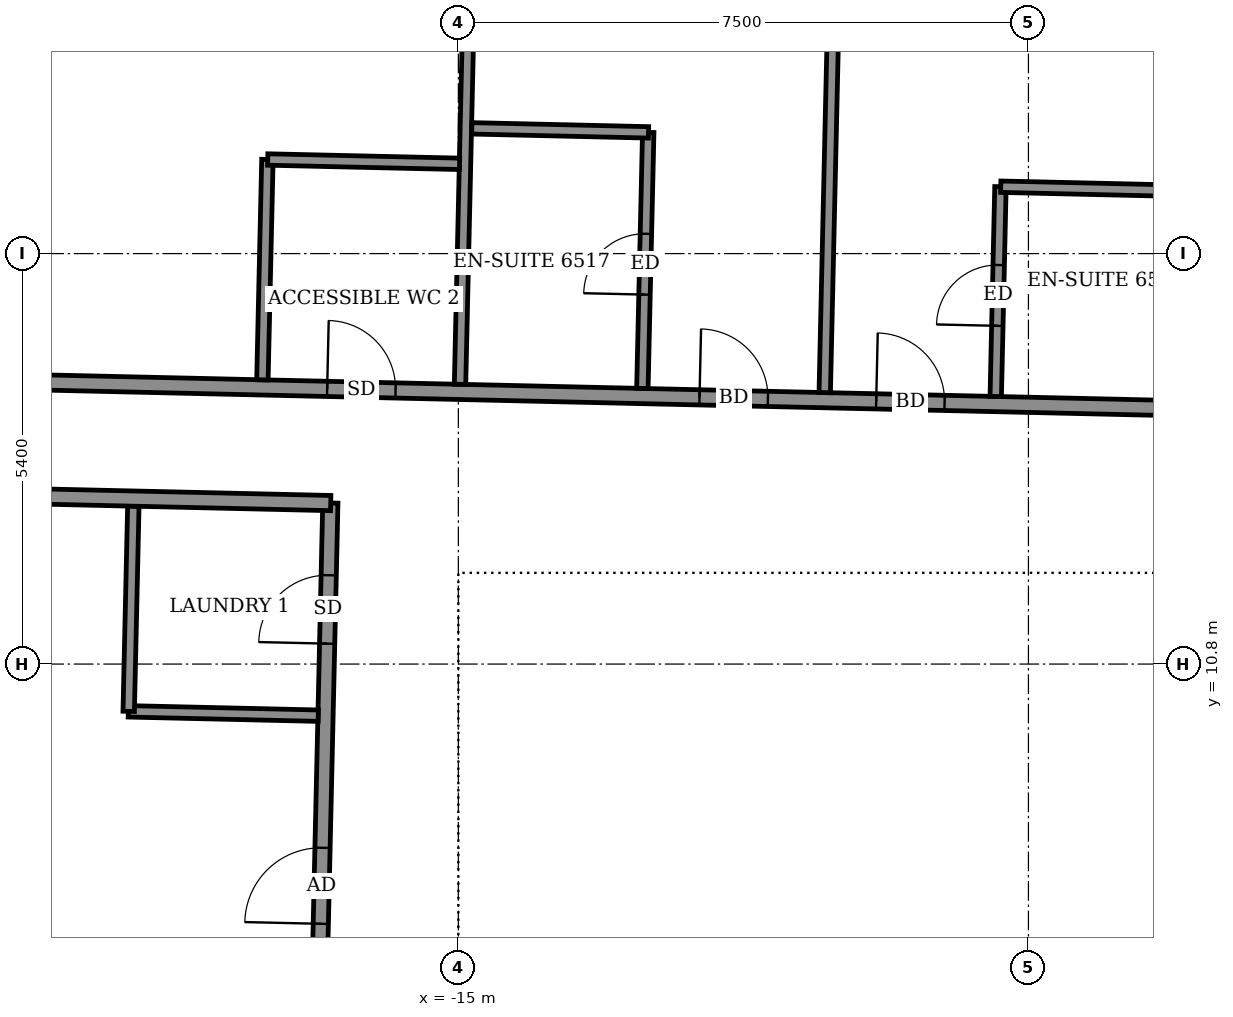
"""IFC4 building model, lengths in metres.
Left out: names, types, materials, properties, quantities, classifications, styles, units other than length and angle.
Written with IfcOpenShell. Run it as: python <this file> out.ifc"""

import sys

from ifc_helpers import new_model, si_unit, direction, frame, frame_2d, origin, place, context, subcontext, project, spatial, rectangle, extrude, element, fill, save


model = new_model("IFC4")
c1 = context("Model", 3, precision=1e-05, world=origin(), true_north=direction((0.0, 1.0)))
c2 = subcontext(c1, "Body", "Model", "MODEL_VIEW")
j1 = project(units=[si_unit("LENGTHUNIT", "METRE"), si_unit("PLANEANGLEUNIT", "RADIAN")], contexts=[c1])
p1 = place(None, origin())
s1 = spatial("IfcSite", under=j1, at=p1, CompositionType="ELEMENT")
p2 = place(p1, origin())
s2 = spatial("IfcBuilding", under=s1, at=p2, CompositionType="ELEMENT")
p3 = place(p2, frame((0.0, 0.0, 257.3)))
s3 = spatial("IfcBuildingStorey", under=s2, at=p3, CompositionType="ELEMENT", Elevation=257.3)
p4 = place(p3, frame((-17.262, -12.525, 0.0), z_axis=(0.0, 0.0, 1.0), x_axis=(0.022706151961, 0.999742182097, 0.0)))
e1 = element("IfcWall", 1, at=p4, inside=s3, PredefinedType="PARTITIONING", context=c2, shape_type="SweptSolid", body=[
    extrude(rectangle(XDim=25.45, YDim=0.2, at=frame_2d((12.725, 0.0))), origin(), (0.0, 0.0, 1.0), 3.05),
])
p5 = place(p4, frame((19.913, 0.0, 0.0)))
e2 = element("IfcOpeningElement", 2, at=p5, cuts=e1, PredefinedType="OPENING", context=c2, shape_type="SweptSolid", body=[
    extrude(rectangle(XDim=1.0, YDim=2.1, at=frame_2d((0.5, 1.05))), frame((0.0, 0.11, 0.0), z_axis=(0.0, -1.0, 0.0), x_axis=(1.0, 0.0, 0.0)), (0.0, 0.0, 1.0), 0.22),
])
p6 = place(p4, frame((23.6, 0.0, 0.0)))
e3 = element("IfcOpeningElement", 3, at=p6, cuts=e1, PredefinedType="OPENING", context=c2, shape_type="SweptSolid", body=[
    extrude(rectangle(XDim=0.9, YDim=2.1, at=frame_2d((0.45, 1.05))), frame((0.0, 0.11, 0.0), z_axis=(0.0, -1.0, 0.0), x_axis=(1.0, 0.0, 0.0)), (0.0, 0.0, 1.0), 0.22),
])
p7 = place(p4, frame((14.05, 0.0, 0.0)))
e4 = element("IfcOpeningElement", 4, at=p7, cuts=e1, PredefinedType="OPENING", context=c2, shape_type="SweptSolid", body=[
    extrude(rectangle(XDim=1.0, YDim=2.1, at=frame_2d((0.5, 1.05))), frame((0.0, 0.11, 0.0), z_axis=(0.0, -1.0, 0.0), x_axis=(1.0, 0.0, 0.0)), (0.0, 0.0, 1.0), 0.22),
])
p8 = place(p4, frame((16.525, 0.0, 0.0)))
e5 = element("IfcOpeningElement", 5, at=p8, cuts=e1, PredefinedType="OPENING", context=c2, shape_type="SweptSolid", body=[
    extrude(rectangle(XDim=0.9, YDim=2.1, at=frame_2d((0.45, 1.05))), frame((0.0, 0.11, 0.0), z_axis=(0.0, -1.0, 0.0), x_axis=(1.0, 0.0, 0.0)), (0.0, 0.0, 1.0), 0.22),
])
p9 = place(p4, frame((11.825, 0.0, 0.0)))
e6 = element("IfcOpeningElement", 6, at=p9, cuts=e1, PredefinedType="OPENING", context=c2, shape_type="SweptSolid", body=[
    extrude(rectangle(XDim=1.0, YDim=2.1, at=frame_2d((0.5, 1.05))), frame((0.0, 0.11, 0.0), z_axis=(0.0, -1.0, 0.0), x_axis=(1.0, 0.0, 0.0)), (0.0, 0.0, 1.0), 0.22),
])
p10 = place(p4, frame((9.575, 0.0, 0.0)))
e7 = element("IfcOpeningElement", 7, at=p10, cuts=e1, PredefinedType="OPENING", context=c2, shape_type="SweptSolid", body=[
    extrude(rectangle(XDim=0.9, YDim=2.1, at=frame_2d((0.45, 1.05))), frame((0.0, 0.11, 0.0), z_axis=(0.0, -1.0, 0.0), x_axis=(1.0, 0.0, 0.0)), (0.0, 0.0, 1.0), 0.22),
])
p11 = place(p4, frame((6.155, 0.0, 0.0)))
e8 = element("IfcOpeningElement", 8, at=p11, cuts=e1, PredefinedType="OPENING", context=c2, shape_type="SweptSolid", body=[
    extrude(rectangle(XDim=1.0, YDim=2.1, at=frame_2d((0.5, 1.05))), frame((0.0, 0.11, 0.0), z_axis=(0.0, -1.0, 0.0), x_axis=(1.0, 0.0, 0.0)), (0.0, 0.0, 1.0), 0.22),
])
p12 = place(p4, frame((0.512, 0.0, 0.0)))
e9 = element("IfcOpeningElement", 9, at=p12, cuts=e1, PredefinedType="OPENING", context=c2, shape_type="SweptSolid", body=[
    extrude(rectangle(XDim=1.0, YDim=2.1, at=frame_2d((0.5, 1.05))), frame((0.0, 0.11, 0.0), z_axis=(0.0, -1.0, 0.0), x_axis=(1.0, 0.0, 0.0)), (0.0, 0.0, 1.0), 0.22),
])
p13 = place(p4, frame((2.775, 0.0, 0.0)))
e10 = element("IfcOpeningElement", 10, at=p13, cuts=e1, PredefinedType="OPENING", context=c2, shape_type="SweptSolid", body=[
    extrude(rectangle(XDim=0.9, YDim=2.1, at=frame_2d((0.45, 1.05))), frame((0.0, 0.11, 0.0), z_axis=(0.0, -1.0, 0.0), x_axis=(1.0, 0.0, 0.0)), (0.0, 0.0, 1.0), 0.22),
])
p14 = place(p3, frame((-19.342, 10.178, 0.0), z_axis=(0.0, 0.0, 1.0), x_axis=(0.999741028149, -0.022756903044, 0.0)))
e11 = element("IfcWall", 11, at=p14, inside=s3, PredefinedType="PARTITIONING", context=c2, shape_type="SweptSolid", body=[
    extrude(rectangle(XDim=2.5, YDim=0.15, at=frame_2d((1.25, 0.0))), origin(), (0.0, 0.0, 1.0), 3.05),
])
p15 = place(p3, frame((-19.337, 10.178, 0.0), z_axis=(0.0, 0.0, 1.0), x_axis=(0.02260842146, 0.999744396973, 0.0)))
e12 = element("IfcWall", 12, at=p15, inside=s3, PredefinedType="PARTITIONING", context=c2, shape_type="SweptSolid", body=[
    extrude(rectangle(XDim=2.7, YDim=0.15, at=frame_2d((1.35, 0.0))), origin(), (0.0, 0.0, 1.0), 3.05),
])
p16 = place(p3, frame((-24.508, 13.096, 0.0), z_axis=(0.0, 0.0, 1.0), x_axis=(0.99974170677, -0.022727070732, 0.0)))
e13 = element("IfcWall", 13, at=p16, inside=s3, PredefinedType="PARTITIONING", context=c2, shape_type="SweptSolid", body=[
    extrude(rectangle(XDim=7.831, YDim=0.2, at=frame_2d((3.916, 0.0))), origin(), (0.0, 0.0, 1.0), 3.05),
])
p17 = place(p3, frame((-24.474, 14.596, 0.0), z_axis=(0.0, 0.0, 1.0), x_axis=(0.999742424031, -0.022695497208, 0.0)))
e14 = element("IfcWall", 14, at=p17, inside=s3, PredefinedType="PARTITIONING", context=c2, shape_type="SweptSolid", body=[
    extrude(rectangle(XDim=52.872, YDim=0.2, at=frame_2d((26.436, 0.0))), origin(), (0.0, 0.0, 1.0), 3.05),
])
p18 = place(p17, frame((51.336, 0.0, 0.0)))
e15 = element("IfcOpeningElement", 15, at=p18, cuts=e14, PredefinedType="OPENING", context=c2, shape_type="SweptSolid", body=[
    extrude(rectangle(XDim=1.0, YDim=2.1, at=frame_2d((0.5, 1.05))), frame((0.0, 0.11, 0.0), z_axis=(0.0, -1.0, 0.0), x_axis=(1.0, 0.0, 0.0)), (0.0, 0.0, 1.0), 0.22),
])
p19 = place(p17, frame((47.25, 0.0, 0.0)))
e16 = element("IfcOpeningElement", 16, at=p19, cuts=e14, PredefinedType="OPENING", context=c2, shape_type="SweptSolid", body=[
    extrude(rectangle(XDim=0.9, YDim=2.1, at=frame_2d((0.45, 1.05))), frame((0.0, 0.11, 0.0), z_axis=(0.0, -1.0, 0.0), x_axis=(1.0, 0.0, 0.0)), (0.0, 0.0, 1.0), 0.22),
])
p20 = place(p17, frame((42.475, 0.0, 0.0)))
e17 = element("IfcOpeningElement", 17, at=p20, cuts=e14, PredefinedType="OPENING", context=c2, shape_type="SweptSolid", body=[
    extrude(rectangle(XDim=0.9, YDim=2.1, at=frame_2d((0.45, 1.05))), frame((0.0, 0.11, 0.0), z_axis=(0.0, -1.0, 0.0), x_axis=(1.0, 0.0, 0.0)), (0.0, 0.0, 1.0), 0.22),
])
p21 = place(p17, frame((40.15, 0.0, 0.0)))
e18 = element("IfcOpeningElement", 18, at=p21, cuts=e14, PredefinedType="OPENING", context=c2, shape_type="SweptSolid", body=[
    extrude(rectangle(XDim=0.9, YDim=2.1, at=frame_2d((0.45, 1.05))), frame((0.0, 0.11, 0.0), z_axis=(0.0, -1.0, 0.0), x_axis=(1.0, 0.0, 0.0)), (0.0, 0.0, 1.0), 0.22),
])
p22 = place(p17, frame((33.15, 0.0, 0.0)))
e19 = element("IfcOpeningElement", 19, at=p22, cuts=e14, PredefinedType="OPENING", context=c2, shape_type="SweptSolid", body=[
    extrude(rectangle(XDim=0.9, YDim=2.1, at=frame_2d((0.45, 1.05))), frame((0.0, 0.11, 0.0), z_axis=(0.0, -1.0, 0.0), x_axis=(1.0, 0.0, 0.0)), (0.0, 0.0, 1.0), 0.22),
])
p23 = place(p17, frame((30.95, 0.0, 0.0)))
e20 = element("IfcOpeningElement", 20, at=p23, cuts=e14, PredefinedType="OPENING", context=c2, shape_type="SweptSolid", body=[
    extrude(rectangle(XDim=0.9, YDim=2.1, at=frame_2d((0.45, 1.05))), frame((0.0, 0.11, 0.0), z_axis=(0.0, -1.0, 0.0), x_axis=(1.0, 0.0, 0.0)), (0.0, 0.0, 1.0), 0.22),
])
p24 = place(p17, frame((23.975, 0.0, 0.0)))
e21 = element("IfcOpeningElement", 21, at=p24, cuts=e14, PredefinedType="OPENING", context=c2, shape_type="SweptSolid", body=[
    extrude(rectangle(XDim=0.9, YDim=2.1, at=frame_2d((0.45, 1.05))), frame((0.0, 0.11, 0.0), z_axis=(0.0, -1.0, 0.0), x_axis=(1.0, 0.0, 0.0)), (0.0, 0.0, 1.0), 0.22),
])
p25 = place(p17, frame((21.925, 0.0, 0.0)))
e22 = element("IfcOpeningElement", 22, at=p25, cuts=e14, PredefinedType="OPENING", context=c2, shape_type="SweptSolid", body=[
    extrude(rectangle(XDim=0.9, YDim=2.1, at=frame_2d((0.45, 1.05))), frame((0.0, 0.11, 0.0), z_axis=(0.0, -1.0, 0.0), x_axis=(1.0, 0.0, 0.0)), (0.0, 0.0, 1.0), 0.22),
])
p26 = place(p17, frame((14.975, 0.0, 0.0)))
e23 = element("IfcOpeningElement", 23, at=p26, cuts=e14, PredefinedType="OPENING", context=c2, shape_type="SweptSolid", body=[
    extrude(rectangle(XDim=0.9, YDim=2.1, at=frame_2d((0.45, 1.05))), frame((0.0, 0.11, 0.0), z_axis=(0.0, -1.0, 0.0), x_axis=(1.0, 0.0, 0.0)), (0.0, 0.0, 1.0), 0.22),
])
p27 = place(p17, frame((12.65, 0.0, 0.0)))
e24 = element("IfcOpeningElement", 24, at=p27, cuts=e14, PredefinedType="OPENING", context=c2, shape_type="SweptSolid", body=[
    extrude(rectangle(XDim=0.9, YDim=2.1, at=frame_2d((0.45, 1.05))), frame((0.0, 0.11, 0.0), z_axis=(0.0, -1.0, 0.0), x_axis=(1.0, 0.0, 0.0)), (0.0, 0.0, 1.0), 0.22),
])
p28 = place(p17, frame((2.0, 0.0, 0.0)))
e25 = element("IfcOpeningElement", 25, at=p28, cuts=e14, PredefinedType="OPENING", context=c2, shape_type="SweptSolid", body=[
    extrude(rectangle(XDim=1.0, YDim=2.1, at=frame_2d((0.5, 1.05))), frame((0.0, 0.11, 0.0), z_axis=(0.0, -1.0, 0.0), x_axis=(1.0, 0.0, 0.0)), (0.0, 0.0, 1.0), 0.22),
])
p29 = place(p17, frame((7.75, 0.0, 0.0)))
e26 = element("IfcOpeningElement", 26, at=p29, cuts=e14, PredefinedType="OPENING", context=c2, shape_type="SweptSolid", body=[
    extrude(rectangle(XDim=0.9, YDim=2.1, at=frame_2d((0.45, 1.05))), frame((0.0, 0.11, 0.0), z_axis=(0.0, -1.0, 0.0), x_axis=(1.0, 0.0, 0.0)), (0.0, 0.0, 1.0), 0.22),
])
p30 = place(p3, frame((-17.578, 14.539, 0.0), z_axis=(0.0, 0.0, 1.0), x_axis=(0.022725229174, 0.999741748633, 0.0)))
e27 = element("IfcWall", 27, at=p30, inside=s3, PredefinedType="PARTITIONING", context=c2, shape_type="SweptSolid", body=[
    extrude(rectangle(XDim=2.901, YDim=0.15, at=frame_2d((1.45, 0.0))), origin(), (0.0, 0.0, 1.0), 3.05),
])
p31 = place(p3, frame((-14.978, 14.48, 0.0), z_axis=(0.0, 0.0, 1.0), x_axis=(0.022697424684, 0.999742380272, 0.0)))
e28 = element("IfcWall", 28, at=p31, inside=s3, PredefinedType="PARTITIONING", context=c2, shape_type="SweptSolid", body=[
    extrude(rectangle(XDim=9.25, YDim=0.15, at=frame_2d((4.625, 0.0))), origin(), (0.0, 0.0, 1.0), 3.05),
])
p32 = place(p3, frame((-12.579, 14.426, 0.0), z_axis=(0.0, 0.0, 1.0), x_axis=(0.022894207861, 0.999737893273, 0.0)))
e29 = element("IfcWall", 29, at=p32, inside=s3, PredefinedType="PARTITIONING", context=c2, shape_type="SweptSolid", body=[
    extrude(rectangle(XDim=3.37, YDim=0.15, at=frame_2d((1.685, 0.0))), origin(), (0.0, 0.0, 1.0), 3.05),
])
p33 = place(p32, frame((1.235, 0.0, 0.0)))
e30 = element("IfcOpeningElement", 30, at=p33, cuts=e29, PredefinedType="OPENING", context=c2, shape_type="SweptSolid", body=[
    extrude(rectangle(XDim=0.8, YDim=2.1, at=frame_2d((0.4, 1.05))), frame((0.0, 0.085, 0.0), z_axis=(0.0, -1.0, 0.0), x_axis=(1.0, 0.0, 0.0)), (0.0, 0.0, 1.0), 0.17),
])
p34 = place(p3, frame((-10.18, 14.371, 0.0), z_axis=(0.0, 0.0, 1.0), x_axis=(0.022698023584, 0.999742366675, 0.0)))
e31 = element("IfcWall", 31, at=p34, inside=s3, PredefinedType="PARTITIONING", context=c2, shape_type="SweptSolid", body=[
    extrude(rectangle(XDim=9.25, YDim=0.15, at=frame_2d((4.625, 0.0))), origin(), (0.0, 0.0, 1.0), 2.55),
])
p35 = place(p3, frame((-7.93, 14.32, 0.0), z_axis=(0.0, 0.0, 1.0), x_axis=(0.022462265691, 0.99974769148, 0.0)))
e32 = element("IfcWall", 32, at=p35, inside=s3, PredefinedType="PARTITIONING", context=c2, shape_type="SweptSolid", body=[
    extrude(rectangle(XDim=2.761, YDim=0.15, at=frame_2d((1.38, 0.0))), origin(), (0.0, 0.0, 1.0), 3.05),
])
p36 = place(p35, frame((0.93, 0.0, 0.0)))
e33 = element("IfcOpeningElement", 33, at=p36, cuts=e32, PredefinedType="OPENING", context=c2, shape_type="SweptSolid", body=[
    extrude(rectangle(XDim=0.8, YDim=2.1, at=frame_2d((0.4, 1.05))), frame((0.0, 0.085, 0.0), z_axis=(0.0, -1.0, 0.0), x_axis=(1.0, 0.0, 0.0)), (0.0, 0.0, 1.0), 0.17),
])
p37 = place(p3, frame((-7.864, 17.08, 0.0), z_axis=(0.0, 0.0, 1.0), x_axis=(0.999740478815, -0.022781023197, 0.0)))
e34 = element("IfcWall", 34, at=p37, inside=s3, PredefinedType="PARTITIONING", context=c2, shape_type="SweptSolid", body=[
    extrude(rectangle(XDim=2.325, YDim=0.15, at=frame_2d((1.163, 0.0))), origin(), (0.0, 0.0, 1.0), 3.05),
])
p38 = place(p3, frame((-17.508, 17.438, 0.0), z_axis=(0.0, 0.0, 1.0), x_axis=(0.999746160391, -0.022530308093, 0.0)))
e35 = element("IfcWall", 35, at=p38, inside=s3, PredefinedType="PARTITIONING", context=c2, shape_type="SweptSolid", body=[
    extrude(rectangle(XDim=2.525, YDim=0.15, at=frame_2d((1.262, 0.0))), origin(), (0.0, 0.0, 1.0), 3.05),
])
p39 = place(p3, frame((-14.823, 17.848, 0.0), z_axis=(0.0, 0.0, 1.0), x_axis=(0.999740478815, -0.022781023197, 0.0)))
e36 = element("IfcWall", 36, at=p39, inside=s3, PredefinedType="PARTITIONING", context=c2, shape_type="SweptSolid", body=[
    extrude(rectangle(XDim=2.325, YDim=0.15, at=frame_2d((1.163, 0.0))), origin(), (0.0, 0.0, 1.0), 3.05),
])
p40 = place(p3, frame((-14.5, 11.15, 0.0), z_axis=(0.0, 0.0, 1.0), x_axis=(1.0, 0.0, 0.0)))
e37 = element("IfcWall", 37, at=p40, inside=s3, PredefinedType="SHEAR", context=c2, shape_type="SweptSolid", body=[
    extrude(rectangle(XDim=29.0, YDim=0.7, at=frame_2d((14.5, 0.0))), origin(), (0.0, 0.0, 1.0), 3.6),
])
p41 = place(p3, frame((-14.15, -10.8, 0.0), z_axis=(0.0, 0.0, 1.0), x_axis=(0.0, 1.0, 0.0)))
e38 = element("IfcWall", 38, at=p41, inside=s3, PredefinedType="SHEAR", context=c2, shape_type="SweptSolid", body=[
    extrude(rectangle(XDim=21.6, YDim=0.7, at=frame_2d((10.8, 0.0))), origin(), (0.0, 0.0, 1.0), 3.6),
])
p42 = place(p41, frame((8.25, 0.0, 0.0)))
e39 = element("IfcOpeningElement", 39, at=p42, cuts=e38, PredefinedType="OPENING", context=c2, shape_type="SweptSolid", body=[
    extrude(rectangle(XDim=1.2, YDim=2.1, at=frame_2d((0.6, 1.05))), frame((0.0, 0.36, 0.0), z_axis=(0.0, -1.0, 0.0), x_axis=(1.0, 0.0, 0.0)), (0.0, 0.0, 1.0), 0.72),
])
p43 = place(p41, frame((15.25, 0.0, 0.0)))
e40 = element("IfcOpeningElement", 40, at=p43, cuts=e38, PredefinedType="OPENING", context=c2, shape_type="SweptSolid", body=[
    extrude(rectangle(XDim=1.2, YDim=2.1, at=frame_2d((0.6, 1.05))), frame((0.0, 0.36, 0.0), z_axis=(0.0, -1.0, 0.0), x_axis=(1.0, 0.0, 0.0)), (0.0, 0.0, 1.0), 0.72),
])
p44 = place(p3, frame((-10.9, 8.1, 0.0), z_axis=(0.0, 0.0, 1.0), x_axis=(1.0, 0.0, 0.0)))
e41 = element("IfcWall", 41, at=p44, inside=s3, PredefinedType="SHEAR", context=c2, shape_type="SweptSolid", body=[
    extrude(rectangle(XDim=21.8, YDim=0.2, at=frame_2d((10.9, 0.0))), origin(), (0.0, 0.0, 1.0), 3.05),
])
p45 = place(p44, frame((4.95, 0.0, 0.0)))
e42 = element("IfcOpeningElement", 42, at=p45, cuts=e41, PredefinedType="OPENING", context=c2, shape_type="SweptSolid", body=[
    extrude(rectangle(XDim=1.1, YDim=2.1, at=frame_2d((0.55, 1.05))), frame((0.0, 0.11, 0.0), z_axis=(0.0, -1.0, 0.0), x_axis=(1.0, 0.0, 0.0)), (0.0, 0.0, 1.0), 0.22),
])
p46 = place(p44, frame((7.65, 0.0, 0.0)))
e43 = element("IfcOpeningElement", 43, at=p46, cuts=e41, PredefinedType="OPENING", context=c2, shape_type="SweptSolid", body=[
    extrude(rectangle(XDim=1.1, YDim=2.1, at=frame_2d((0.55, 1.05))), frame((0.0, 0.11, 0.0), z_axis=(0.0, -1.0, 0.0), x_axis=(1.0, 0.0, 0.0)), (0.0, 0.0, 1.0), 0.22),
])
p47 = place(p44, frame((10.35, 0.0, 0.0)))
e44 = element("IfcOpeningElement", 44, at=p47, cuts=e41, PredefinedType="OPENING", context=c2, shape_type="SweptSolid", body=[
    extrude(rectangle(XDim=1.1, YDim=2.1, at=frame_2d((0.55, 1.05))), frame((0.0, 0.11, 0.0), z_axis=(0.0, -1.0, 0.0), x_axis=(1.0, 0.0, 0.0)), (0.0, 0.0, 1.0), 0.22),
])
p48 = place(p44, frame((1.675, 0.0, 0.0)))
e45 = element("IfcOpeningElement", 45, at=p48, cuts=e41, PredefinedType="OPENING", context=c2, shape_type="SweptSolid", body=[
    extrude(rectangle(XDim=0.9, YDim=2.1, at=frame_2d((0.45, 1.05))), frame((0.0, 0.11, 0.0), z_axis=(0.0, -1.0, 0.0), x_axis=(1.0, 0.0, 0.0)), (0.0, 0.0, 1.0), 0.22),
])
p49 = place(p44, frame((13.825, 0.0, 0.0)))
e46 = element("IfcOpeningElement", 46, at=p49, cuts=e41, PredefinedType="OPENING", context=c2, shape_type="SweptSolid", body=[
    extrude(rectangle(XDim=0.9, YDim=2.1, at=frame_2d((0.45, 1.05))), frame((0.0, 0.11, 0.0), z_axis=(0.0, -1.0, 0.0), x_axis=(1.0, 0.0, 0.0)), (0.0, 0.0, 1.0), 0.22),
])
p50 = place(p44, frame((18.55, 0.0, 0.0)))
e47 = element("IfcOpeningElement", 47, at=p50, cuts=e41, PredefinedType="OPENING", context=c2, shape_type="SweptSolid", body=[
    extrude(rectangle(XDim=0.9, YDim=2.1, at=frame_2d((0.45, 1.05))), frame((0.0, 0.11, 0.0), z_axis=(0.0, -1.0, 0.0), x_axis=(1.0, 0.0, 0.0)), (0.0, 0.0, 1.0), 0.22),
])
p51 = place(p3, frame((-10.8, 8.2, 0.0), z_axis=(0.0, 0.0, 1.0), x_axis=(0.0, 1.0, 0.0)))
e48 = element("IfcWall", 48, at=p51, inside=s3, PredefinedType="STANDARD", context=c2, shape_type="SweptSolid", body=[
    extrude(rectangle(XDim=2.6, YDim=0.2, at=frame_2d((1.3, 0.0))), origin(), (0.0, 0.0, 1.0), 3.05),
])
p52 = place(p3, frame((-6.75, 8.2, 0.0), z_axis=(0.0, 0.0, 1.0), x_axis=(0.0, 1.0, 0.0)))
e49 = element("IfcWall", 49, at=p52, inside=s3, PredefinedType="SHEAR", context=c2, shape_type="SweptSolid", body=[
    extrude(rectangle(XDim=2.6, YDim=0.2, at=frame_2d((1.3, 0.0))), origin(), (0.0, 0.0, 1.0), 3.05),
])
p53 = place(p26, origin())
e50 = element("IfcDoor", 50, at=p53, inside=s3, OperationType="SINGLE_SWING_RIGHT", PredefinedType="DOOR", context=c2, shape_type="SweptSolid", body=[
    extrude(rectangle(XDim=0.9, YDim=2.1, at=frame_2d((0.45, 1.05))), frame((0.0, 0.025, 0.0), z_axis=(0.0, -1.0, 0.0), x_axis=(1.0, 0.0, 0.0)), (0.0, 0.0, 1.0), 0.05),
])
fill(e23, e50)
p54 = place(p36, origin())
e51 = element("IfcDoor", 51, at=p54, inside=s3, OperationType="SINGLE_SWING_RIGHT", PredefinedType="DOOR", context=c2, shape_type="SweptSolid", body=[
    extrude(rectangle(XDim=0.8, YDim=2.1, at=frame_2d((0.4, 1.05))), frame((0.0, 0.025, 0.0), z_axis=(0.0, -1.0, 0.0), x_axis=(1.0, 0.0, 0.0)), (0.0, 0.0, 1.0), 0.05),
])
fill(e33, e51)
p55 = place(p27, origin())
e52 = element("IfcDoor", 52, at=p55, inside=s3, OperationType="SINGLE_SWING_LEFT", PredefinedType="DOOR", context=c2, shape_type="SweptSolid", body=[
    extrude(rectangle(XDim=0.9, YDim=2.1, at=frame_2d((0.45, 1.05))), frame((0.0, 0.025, 0.0), z_axis=(0.0, -1.0, 0.0), x_axis=(1.0, 0.0, 0.0)), (0.0, 0.0, 1.0), 0.05),
])
fill(e24, e52)
p56 = place(p33, origin())
e53 = element("IfcDoor", 53, at=p56, inside=s3, OperationType="SINGLE_SWING_LEFT", PredefinedType="DOOR", context=c2, shape_type="SweptSolid", body=[
    extrude(rectangle(XDim=0.8, YDim=2.1, at=frame_2d((0.4, 1.05))), frame((0.0, 0.025, 0.0), z_axis=(0.0, -1.0, 0.0), x_axis=(1.0, 0.0, 0.0)), (0.0, 0.0, 1.0), 0.05),
])
fill(e30, e53)
p57 = place(p29, origin())
e54 = element("IfcDoor", 54, at=p57, inside=s3, OperationType="SINGLE_SWING_RIGHT", PredefinedType="DOOR", context=c2, shape_type="SweptSolid", body=[
    extrude(rectangle(XDim=0.9, YDim=2.1, at=frame_2d((0.45, 1.05))), frame((0.0, 0.025, 0.0), z_axis=(0.0, -1.0, 0.0), x_axis=(1.0, 0.0, 0.0)), (0.0, 0.0, 1.0), 0.05),
])
fill(e26, e54)
p58 = place(p5, origin())
e55 = element("IfcDoor", 55, at=p58, inside=s3, OperationType="SINGLE_SWING_LEFT", PredefinedType="DOOR", context=c2, shape_type="SweptSolid", body=[
    extrude(rectangle(XDim=1.0, YDim=2.1, at=frame_2d((0.5, 1.05))), frame((0.0, 0.025, 0.0), z_axis=(0.0, -1.0, 0.0), x_axis=(1.0, 0.0, 0.0)), (0.0, 0.0, 1.0), 0.05),
])
fill(e2, e55)
p59 = place(p6, origin())
e56 = element("IfcDoor", 56, at=p59, inside=s3, OperationType="SINGLE_SWING_LEFT", PredefinedType="DOOR", context=c2, shape_type="SweptSolid", body=[
    extrude(rectangle(XDim=0.9, YDim=2.1, at=frame_2d((0.45, 1.05))), frame((0.0, 0.025, 0.0), z_axis=(0.0, -1.0, 0.0), x_axis=(1.0, 0.0, 0.0)), (0.0, 0.0, 1.0), 0.05),
])
fill(e3, e56)
p60 = place(p45, origin())
e57 = element("IfcDoor", 57, at=p60, inside=s3, OperationType="SLIDING_TO_LEFT", PredefinedType="DOOR", context=c2, shape_type="SweptSolid", body=[
    extrude(rectangle(XDim=1.1, YDim=2.1, at=frame_2d((0.55, 1.05))), frame((0.0, 0.025, 0.0), z_axis=(0.0, -1.0, 0.0), x_axis=(1.0, 0.0, 0.0)), (0.0, 0.0, 1.0), 0.05),
])
fill(e42, e57)
p61 = place(p48, origin())
e58 = element("IfcDoor", 58, at=p61, inside=s3, OperationType="SINGLE_SWING_RIGHT", PredefinedType="DOOR", context=c2, shape_type="SweptSolid", body=[
    extrude(rectangle(XDim=0.9, YDim=2.1, at=frame_2d((0.45, 1.05))), frame((0.0, 0.025, 0.0), z_axis=(0.0, -1.0, 0.0), x_axis=(1.0, 0.0, 0.0)), (0.0, 0.0, 1.0), 0.05),
])
fill(e45, e58)
save(model, sys.argv[1])
